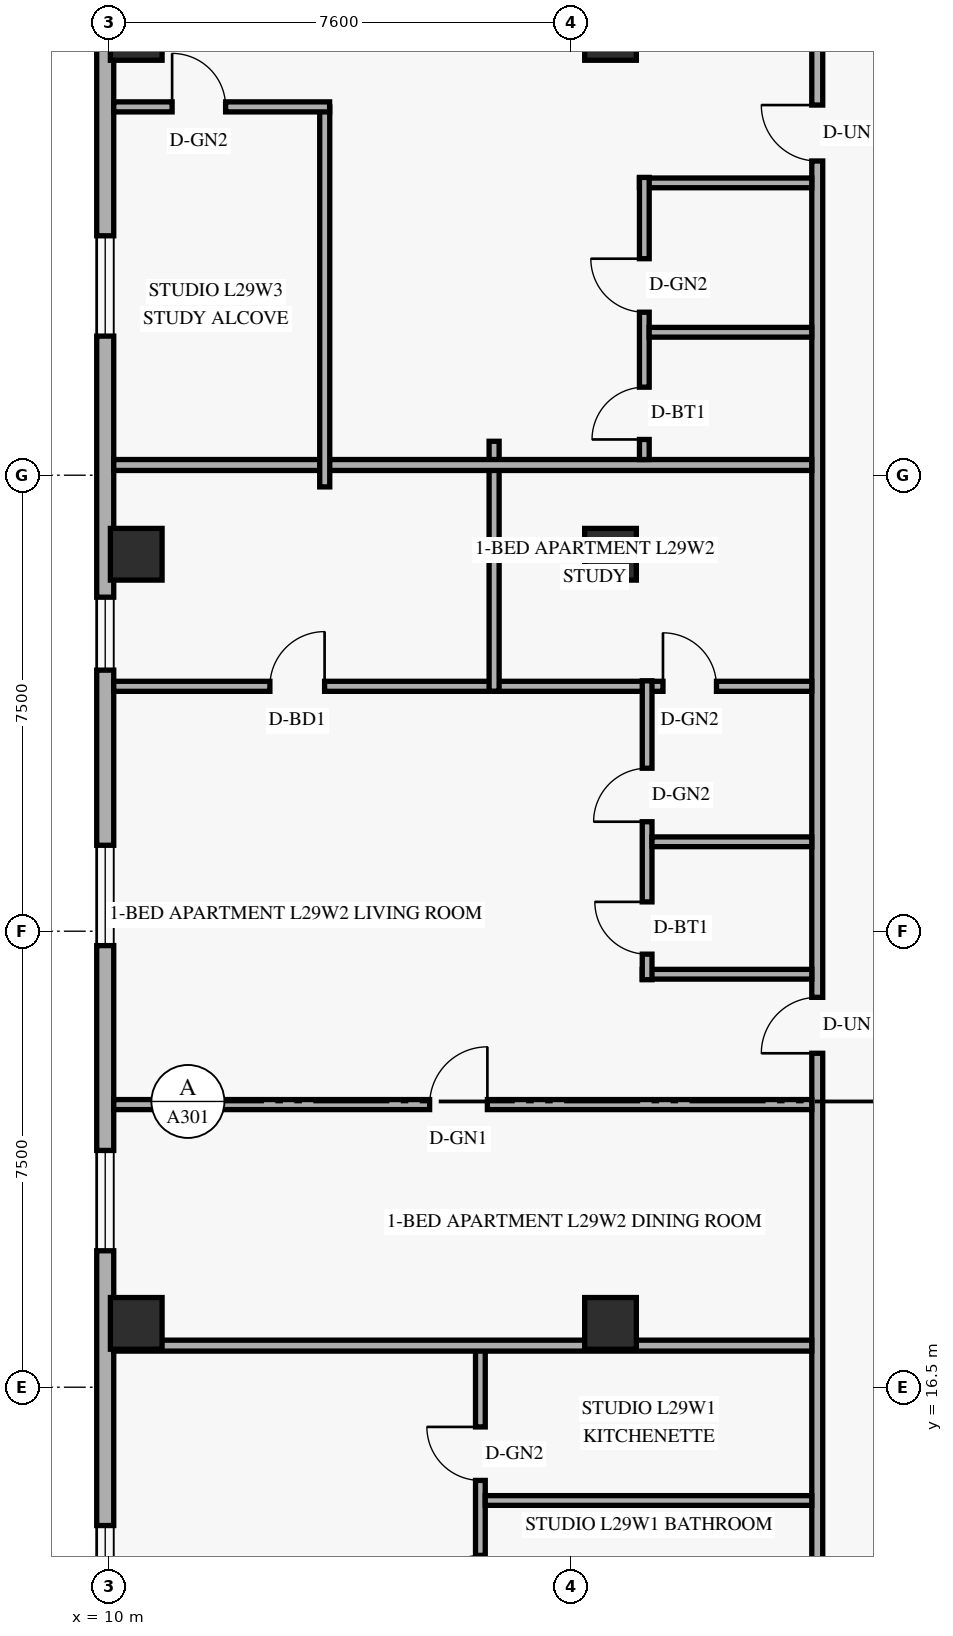
"""IFC4 building model, lengths in metres.
Left out: names, types, materials, properties, quantities, classifications, styles, units other than length and angle.
Written with IfcOpenShell. Run it as: python <this file> out.ifc"""

import sys

from ifc_helpers import new_model, si_unit, direction, frame, frame_2d, origin, origin_2d, place, context, subcontext, project, spatial, rectangle, extrude, element, fill, save


model = new_model("IFC4")
c1 = context("Model", 3, precision=1e-05, world=origin(), true_north=direction((0.0, 1.0)))
c2 = subcontext(c1, "Body", "Model", "MODEL_VIEW")
j1 = project(units=[si_unit("LENGTHUNIT", "METRE"), si_unit("PLANEANGLEUNIT", "RADIAN")], contexts=[c1])
p1 = place(None, origin())
s1 = spatial("IfcSite", under=j1, at=p1, CompositionType="ELEMENT")
p2 = place(p1, origin())
s2 = spatial("IfcBuilding", under=s1, at=p2, CompositionType="ELEMENT")
p3 = place(p2, frame((0.0, 0.0, 113.4)))
s3 = spatial("IfcBuildingStorey", under=s2, at=p3, CompositionType="ELEMENT", Elevation=113.4)
for number, where, z_axis, x_axis in (
    (1, (10.45, 17.55, 0.0), (0.0, 0.0, 1.0), (1.0, 0.0, 0.0)),
    (2, (10.45, 30.2, 0.0), (0.0, 0.0, 1.0), (1.0, 0.0, 0.0)),
    (3, (10.45, 38.75, 0.0), (0.0, 0.0, 1.0), (1.0, 0.0, 0.0)),
    (4, (18.25, 17.55, 0.0), (0.0, 0.0, 1.0), (1.0, 0.0, 0.0)),
    (5, (18.25, 30.2, 0.0), (0.0, 0.0, 1.0), (1.0, 0.0, 0.0)),
    (6, (18.25, 38.75, 0.0), (0.0, 0.0, 1.0), (1.0, 0.0, 0.0)),
):
    element("IfcColumn", number, at=place(p3, frame(where, z_axis=z_axis, x_axis=x_axis)), inside=s3, PredefinedType="COLUMN", context=c2, shape_type="SweptSolid", body=[
        extrude(rectangle(XDim=0.85, YDim=0.85, at=origin_2d()), origin(), (0.0, 0.0, 1.0), 3.6),
    ])
p4 = place(p3, frame((9.94, 41.68, 0.0), z_axis=(0.0, 0.0, 1.0), x_axis=(0.0, -1.0, 0.0)))
e7 = element("IfcWall", 7, at=p4, inside=s3, PredefinedType="SOLIDWALL", context=c2, shape_type="SweptSolid", body=[
    extrude(rectangle(XDim=35.36, YDim=0.28, at=frame_2d((17.68, 0.0))), origin(), (0.0, 0.0, 1.0), 3.35),
])
p5 = place(p4, frame((27.455, 0.0, 0.85)))
e8 = element("IfcOpeningElement", 8, at=p5, cuts=e7, PredefinedType="OPENING", context=c2, shape_type="SweptSolid", body=[
    extrude(rectangle(XDim=1.65, YDim=1.6, at=frame_2d((0.825, 0.8))), frame((0.0, 0.15, 0.0), z_axis=(0.0, -1.0, 0.0), x_axis=(1.0, 0.0, 0.0)), (0.0, 0.0, 1.0), 0.3),
])
p6 = place(p4, frame((21.286, 0.0, 0.85)))
e9 = element("IfcOpeningElement", 9, at=p6, cuts=e7, PredefinedType="OPENING", context=c2, shape_type="SweptSolid", body=[
    extrude(rectangle(XDim=1.65, YDim=1.6, at=frame_2d((0.825, 0.8))), frame((0.0, 0.15, 0.0), z_axis=(0.0, -1.0, 0.0), x_axis=(1.0, 0.0, 0.0)), (0.0, 0.0, 1.0), 0.3),
])
p7 = place(p4, frame((16.267, 0.0, 0.85)))
e10 = element("IfcOpeningElement", 10, at=p7, cuts=e7, PredefinedType="OPENING", context=c2, shape_type="SweptSolid", body=[
    extrude(rectangle(XDim=1.65, YDim=1.6, at=frame_2d((0.825, 0.8))), frame((0.0, 0.15, 0.0), z_axis=(0.0, -1.0, 0.0), x_axis=(1.0, 0.0, 0.0)), (0.0, 0.0, 1.0), 0.3),
])
p8 = place(p4, frame((12.186, 0.0, 0.85)))
e11 = element("IfcOpeningElement", 11, at=p8, cuts=e7, PredefinedType="OPENING", context=c2, shape_type="SweptSolid", body=[
    extrude(rectangle(XDim=1.2, YDim=1.5, at=frame_2d((0.6, 0.75))), frame((0.0, 0.15, 0.0), z_axis=(0.0, -1.0, 0.0), x_axis=(1.0, 0.0, 0.0)), (0.0, 0.0, 1.0), 0.3),
])
p9 = place(p4, frame((6.242, 0.0, 0.85)))
e12 = element("IfcOpeningElement", 12, at=p9, cuts=e7, PredefinedType="OPENING", context=c2, shape_type="SweptSolid", body=[
    extrude(rectangle(XDim=1.65, YDim=1.6, at=frame_2d((0.825, 0.8))), frame((0.0, 0.15, 0.0), z_axis=(0.0, -1.0, 0.0), x_axis=(1.0, 0.0, 0.0)), (0.0, 0.0, 1.0), 0.3),
])
p10 = place(p4, frame((0.58, 0.0, 0.85)))
e13 = element("IfcOpeningElement", 13, at=p10, cuts=e7, PredefinedType="OPENING", context=c2, shape_type="SweptSolid", body=[
    extrude(rectangle(XDim=1.65, YDim=1.6, at=frame_2d((0.825, 0.8))), frame((0.0, 0.15, 0.0), z_axis=(0.0, -1.0, 0.0), x_axis=(1.0, 0.0, 0.0)), (0.0, 0.0, 1.0), 0.3),
])
p11 = place(p3, frame((21.65, 6.8, 0.0), z_axis=(0.0, 0.0, 1.0), x_axis=(0.0, 1.0, 0.0)))
e14 = element("IfcWall", 14, at=p11, inside=s3, PredefinedType="STANDARD", context=c2, shape_type="SweptSolid", body=[
    extrude(rectangle(XDim=34.4, YDim=0.18, at=frame_2d((17.2, 0.0))), origin(), (0.0, 0.0, 1.0), 2.721),
])
p12 = place(p11, frame((4.444, 0.0, 0.0)))
e15 = element("IfcOpeningElement", 15, at=p12, cuts=e14, PredefinedType="OPENING", context=c2, shape_type="SweptSolid", body=[
    extrude(rectangle(XDim=0.92, YDim=2.15, at=frame_2d((0.46, 1.075))), frame((0.0, 0.1, 0.0), z_axis=(0.0, -1.0, 0.0), x_axis=(1.0, 0.0, 0.0)), (0.0, 0.0, 1.0), 0.2),
])
p13 = place(p11, frame((15.192, 0.0, 0.0)))
e16 = element("IfcOpeningElement", 16, at=p13, cuts=e14, PredefinedType="OPENING", context=c2, shape_type="SweptSolid", body=[
    extrude(rectangle(XDim=0.92, YDim=2.15, at=frame_2d((0.46, 1.075))), frame((0.0, 0.1, 0.0), z_axis=(0.0, -1.0, 0.0), x_axis=(1.0, 0.0, 0.0)), (0.0, 0.0, 1.0), 0.2),
])
p14 = place(p11, frame((29.868, 0.0, 0.0)))
e17 = element("IfcOpeningElement", 17, at=p14, cuts=e14, PredefinedType="OPENING", context=c2, shape_type="SweptSolid", body=[
    extrude(rectangle(XDim=0.92, YDim=2.15, at=frame_2d((0.46, 1.075))), frame((0.0, 0.1, 0.0), z_axis=(0.0, -1.0, 0.0), x_axis=(1.0, 0.0, 0.0)), (0.0, 0.0, 1.0), 0.2),
])
p15 = place(p3, frame((16.11, 12.454, 0.0), z_axis=(0.0, 0.0, 1.0), x_axis=(0.0, 1.0, 0.0)))
e18 = element("IfcWall", 18, at=p15, inside=s3, PredefinedType="PLUMBINGWALL", context=c2, shape_type="SweptSolid", body=[
    extrude(rectangle(XDim=4.73, YDim=0.16, at=frame_2d((2.365, 0.0))), origin(), (0.0, 0.0, 1.0), 2.978),
])
p16 = place(p15, frame((0.42, 0.0, 0.0)))
e19 = element("IfcOpeningElement", 19, at=p16, cuts=e18, PredefinedType="OPENING", context=c2, shape_type="SweptSolid", body=[
    extrude(rectangle(XDim=0.86, YDim=2.12, at=frame_2d((0.43, 1.06))), frame((0.0, 0.09, 0.0), z_axis=(0.0, -1.0, 0.0), x_axis=(1.0, 0.0, 0.0)), (0.0, 0.0, 1.0), 0.18),
])
p17 = place(p15, frame((2.513, 0.0, 0.0)))
e20 = element("IfcOpeningElement", 20, at=p17, cuts=e18, PredefinedType="OPENING", context=c2, shape_type="SweptSolid", body=[
    extrude(rectangle(XDim=0.88, YDim=2.12, at=frame_2d((0.44, 1.06))), frame((0.0, 0.09, 0.0), z_axis=(0.0, -1.0, 0.0), x_axis=(1.0, 0.0, 0.0)), (0.0, 0.0, 1.0), 0.18),
])
p18 = place(p3, frame((16.19, 14.637, 0.0), z_axis=(0.0, 0.0, 1.0), x_axis=(1.0, 0.0, 0.0)))
e21 = element("IfcWall", 21, at=p18, inside=s3, PredefinedType="PLUMBINGWALL", context=c2, shape_type="SweptSolid", body=[
    extrude(rectangle(XDim=5.37, YDim=0.16, at=frame_2d((2.685, 0.0))), origin(), (0.0, 0.0, 1.0), 2.721),
])
p19 = place(p3, frame((10.08, 17.184, 0.0), z_axis=(0.0, 0.0, 1.0), x_axis=(1.0, 0.0, 0.0)))
e22 = element("IfcWall", 22, at=p19, inside=s3, PredefinedType="PARTITIONING", context=c2, shape_type="SweptSolid", body=[
    extrude(rectangle(XDim=11.48, YDim=0.18, at=frame_2d((5.74, 0.0))), origin(), (0.0, 0.0, 1.0), 2.721),
])
p20 = place(p3, frame((10.08, 28.028, 0.0), z_axis=(0.0, 0.0, 1.0), x_axis=(1.0, 0.0, 0.0)))
e23 = element("IfcWall", 23, at=p20, inside=s3, PredefinedType="PARTITIONING", context=c2, shape_type="SweptSolid", body=[
    extrude(rectangle(XDim=11.48, YDim=0.165, at=frame_2d((5.74, 0.0))), origin(), (0.0, 0.0, 1.0), 2.721),
])
p21 = place(p20, frame((9.033, 0.0, 0.0)))
e24 = element("IfcOpeningElement", 24, at=p21, cuts=e23, PredefinedType="OPENING", context=c2, shape_type="SweptSolid", body=[
    extrude(rectangle(XDim=0.88, YDim=2.12, at=frame_2d((0.44, 1.06))), frame((0.0, 0.093, 0.0), z_axis=(0.0, -1.0, 0.0), x_axis=(1.0, 0.0, 0.0)), (0.0, 0.0, 1.0), 0.185),
])
p22 = place(p20, frame((2.568, 0.0, 0.0)))
e25 = element("IfcOpeningElement", 25, at=p22, cuts=e23, PredefinedType="OPENING", context=c2, shape_type="SweptSolid", body=[
    extrude(rectangle(XDim=0.9, YDim=2.14, at=frame_2d((0.45, 1.07))), frame((0.0, 0.093, 0.0), z_axis=(0.0, -1.0, 0.0), x_axis=(1.0, 0.0, 0.0)), (0.0, 0.0, 1.0), 0.185),
])
p23 = place(p3, frame((18.772, 23.292, 0.0), z_axis=(0.0, 0.0, 1.0), x_axis=(1.0, 0.0, 0.0)))
e26 = element("IfcWall", 26, at=p23, inside=s3, PredefinedType="PLUMBINGWALL", context=c2, shape_type="SweptSolid", body=[
    extrude(rectangle(XDim=2.788, YDim=0.16, at=frame_2d((1.394, 0.0))), origin(), (0.0, 0.0, 1.0), 3.35),
])
p24 = place(p3, frame((18.852, 23.202, 0.0), z_axis=(0.0, 0.0, 1.0), x_axis=(0.0, 1.0, 0.0)))
e27 = element("IfcWall", 27, at=p24, inside=s3, PredefinedType="PLUMBINGWALL", context=c2, shape_type="SweptSolid", body=[
    extrude(rectangle(XDim=4.916, YDim=0.16, at=frame_2d((2.458, 0.0))), origin(), (0.0, 0.0, 1.0), 3.35),
])
p25 = place(p24, frame((0.42, 0.0, 0.0)))
e28 = element("IfcOpeningElement", 28, at=p25, cuts=e27, PredefinedType="OPENING", context=c2, shape_type="SweptSolid", body=[
    extrude(rectangle(XDim=0.86, YDim=2.12, at=frame_2d((0.43, 1.06))), frame((0.0, 0.09, 0.0), z_axis=(0.0, -1.0, 0.0), x_axis=(1.0, 0.0, 0.0)), (0.0, 0.0, 1.0), 0.18),
])
p26 = place(p24, frame((2.598, 0.0, 0.0)))
e29 = element("IfcOpeningElement", 29, at=p26, cuts=e27, PredefinedType="OPENING", context=c2, shape_type="SweptSolid", body=[
    extrude(rectangle(XDim=0.88, YDim=2.12, at=frame_2d((0.44, 1.06))), frame((0.0, 0.09, 0.0), z_axis=(0.0, -1.0, 0.0), x_axis=(1.0, 0.0, 0.0)), (0.0, 0.0, 1.0), 0.18),
])
p27 = place(p3, frame((18.932, 25.471, 0.0), z_axis=(0.0, 0.0, 1.0), x_axis=(1.0, 0.0, 0.0)))
e30 = element("IfcWall", 30, at=p27, inside=s3, PredefinedType="PLUMBINGWALL", context=c2, shape_type="SweptSolid", body=[
    extrude(rectangle(XDim=2.628, YDim=0.16, at=frame_2d((1.314, 0.0))), origin(), (0.0, 0.0, 1.0), 3.35),
])
p28 = place(p3, frame((10.08, 21.149, 0.0), z_axis=(0.0, 0.0, 1.0), x_axis=(1.0, 0.0, 0.0)))
e31 = element("IfcWall", 31, at=p28, inside=s3, PredefinedType="PARTITIONING", context=c2, shape_type="SweptSolid", body=[
    extrude(rectangle(XDim=11.48, YDim=0.165, at=frame_2d((5.74, 0.0))), origin(), (0.0, 0.0, 1.0), 2.721),
])
p29 = place(p28, frame((5.195, 0.0, 0.0)))
e32 = element("IfcOpeningElement", 32, at=p29, cuts=e31, PredefinedType="OPENING", context=c2, shape_type="SweptSolid", body=[
    extrude(rectangle(XDim=0.95, YDim=2.15, at=frame_2d((0.475, 1.075))), frame((0.0, 0.093, 0.0), z_axis=(0.0, -1.0, 0.0), x_axis=(1.0, 0.0, 0.0)), (0.0, 0.0, 1.0), 0.185),
])
p30 = place(p3, frame((16.335, 27.948, 0.0), z_axis=(0.0, 0.0, 1.0), x_axis=(0.0, 1.0, 0.0)))
e33 = element("IfcWall", 33, at=p30, inside=s3, PredefinedType="PARTITIONING", context=c2, shape_type="SweptSolid", body=[
    extrude(rectangle(XDim=4.11, YDim=0.165, at=frame_2d((2.055, 0.0))), origin(), (0.0, 0.0, 1.0), 2.721),
])
p31 = place(p3, frame((10.08, 31.668, 0.0), z_axis=(0.0, 0.0, 1.0), x_axis=(1.0, 0.0, 0.0)))
e34 = element("IfcWall", 34, at=p31, inside=s3, PredefinedType="PARTITIONING", context=c2, shape_type="SweptSolid", body=[
    extrude(rectangle(XDim=11.48, YDim=0.18, at=frame_2d((5.74, 0.0))), origin(), (0.0, 0.0, 1.0), 2.721),
])
p32 = place(p3, frame((18.726, 36.308, 0.0), z_axis=(0.0, 0.0, 1.0), x_axis=(1.0, 0.0, 0.0)))
e35 = element("IfcWall", 35, at=p32, inside=s3, PredefinedType="PLUMBINGWALL", context=c2, shape_type="SweptSolid", body=[
    extrude(rectangle(XDim=2.834, YDim=0.16, at=frame_2d((1.417, 0.0))), origin(), (0.0, 0.0, 1.0), 3.35),
])
p33 = place(p3, frame((18.806, 31.758, 0.0), z_axis=(0.0, 0.0, 1.0), x_axis=(0.0, 1.0, 0.0)))
e36 = element("IfcWall", 36, at=p33, inside=s3, PredefinedType="PLUMBINGWALL", context=c2, shape_type="SweptSolid", body=[
    extrude(rectangle(XDim=4.64, YDim=0.16, at=frame_2d((2.32, 0.0))), origin(), (0.0, 0.0, 1.0), 2.978),
])
p34 = place(p33, frame((0.33, 0.0, 0.0)))
e37 = element("IfcOpeningElement", 37, at=p34, cuts=e36, PredefinedType="OPENING", context=c2, shape_type="SweptSolid", body=[
    extrude(rectangle(XDim=0.86, YDim=2.12, at=frame_2d((0.43, 1.06))), frame((0.0, 0.09, 0.0), z_axis=(0.0, -1.0, 0.0), x_axis=(1.0, 0.0, 0.0)), (0.0, 0.0, 1.0), 0.18),
])
p35 = place(p33, frame((2.423, 0.0, 0.0)))
e38 = element("IfcOpeningElement", 38, at=p35, cuts=e36, PredefinedType="OPENING", context=c2, shape_type="SweptSolid", body=[
    extrude(rectangle(XDim=0.88, YDim=2.12, at=frame_2d((0.44, 1.06))), frame((0.0, 0.09, 0.0), z_axis=(0.0, -1.0, 0.0), x_axis=(1.0, 0.0, 0.0)), (0.0, 0.0, 1.0), 0.18),
])
p36 = place(p3, frame((18.886, 33.851, 0.0), z_axis=(0.0, 0.0, 1.0), x_axis=(1.0, 0.0, 0.0)))
e39 = element("IfcWall", 39, at=p36, inside=s3, PredefinedType="PLUMBINGWALL", context=c2, shape_type="SweptSolid", body=[
    extrude(rectangle(XDim=2.674, YDim=0.16, at=frame_2d((1.337, 0.0))), origin(), (0.0, 0.0, 1.0), 3.35),
])
p37 = place(p3, frame((13.55, 31.308, 0.0), z_axis=(0.0, 0.0, 1.0), x_axis=(0.0, 1.0, 0.0)))
e40 = element("IfcWall", 40, at=p37, inside=s3, PredefinedType="PARTITIONING", context=c2, shape_type="SweptSolid", body=[
    extrude(rectangle(XDim=6.25, YDim=0.165, at=frame_2d((3.125, 0.0))), origin(), (0.0, 0.0, 1.0), 2.978),
])
p38 = place(p3, frame((10.08, 37.558, 0.0), z_axis=(0.0, 0.0, 1.0), x_axis=(1.0, 0.0, 0.0)))
e41 = element("IfcWall", 41, at=p38, inside=s3, PredefinedType="PARTITIONING", context=c2, shape_type="SweptSolid", body=[
    extrude(rectangle(XDim=3.55, YDim=0.165, at=frame_2d((1.775, 0.0))), origin(), (0.0, 0.0, 1.0), 2.799),
])
p39 = place(p38, frame((0.96, 0.0, 0.0)))
e42 = element("IfcOpeningElement", 42, at=p39, cuts=e41, PredefinedType="OPENING", context=c2, shape_type="SweptSolid", body=[
    extrude(rectangle(XDim=0.88, YDim=2.12, at=frame_2d((0.44, 1.06))), frame((0.0, 0.093, 0.0), z_axis=(0.0, -1.0, 0.0), x_axis=(1.0, 0.0, 0.0)), (0.0, 0.0, 1.0), 0.185),
])
p40 = place(p5, origin())
e43 = element("IfcWindow", 43, at=p40, inside=s3, PartitioningType="SINGLE_PANEL", PredefinedType="WINDOW", context=c2, shape_type="SweptSolid", body=[
    extrude(rectangle(XDim=1.65, YDim=1.6, at=frame_2d((0.825, 0.8))), frame((0.0, 0.03, 0.0), z_axis=(0.0, -1.0, 0.0), x_axis=(1.0, 0.0, 0.0)), (0.0, 0.0, 1.0), 0.06),
])
fill(e8, e43)
p41 = place(p6, origin())
e44 = element("IfcWindow", 44, at=p41, inside=s3, PartitioningType="SINGLE_PANEL", PredefinedType="WINDOW", context=c2, shape_type="SweptSolid", body=[
    extrude(rectangle(XDim=1.65, YDim=1.6, at=frame_2d((0.825, 0.8))), frame((0.0, 0.03, 0.0), z_axis=(0.0, -1.0, 0.0), x_axis=(1.0, 0.0, 0.0)), (0.0, 0.0, 1.0), 0.06),
])
fill(e9, e44)
p42 = place(p7, origin())
e45 = element("IfcWindow", 45, at=p42, inside=s3, PartitioningType="SINGLE_PANEL", PredefinedType="WINDOW", context=c2, shape_type="SweptSolid", body=[
    extrude(rectangle(XDim=1.65, YDim=1.6, at=frame_2d((0.825, 0.8))), frame((0.0, 0.03, 0.0), z_axis=(0.0, -1.0, 0.0), x_axis=(1.0, 0.0, 0.0)), (0.0, 0.0, 1.0), 0.06),
])
fill(e10, e45)
p43 = place(p8, origin())
e46 = element("IfcWindow", 46, at=p43, inside=s3, PartitioningType="SINGLE_PANEL", PredefinedType="WINDOW", context=c2, shape_type="SweptSolid", body=[
    extrude(rectangle(XDim=1.2, YDim=1.5, at=frame_2d((0.6, 0.75))), frame((0.0, 0.03, 0.0), z_axis=(0.0, -1.0, 0.0), x_axis=(1.0, 0.0, 0.0)), (0.0, 0.0, 1.0), 0.06),
])
fill(e11, e46)
p44 = place(p9, origin())
e47 = element("IfcWindow", 47, at=p44, inside=s3, PartitioningType="SINGLE_PANEL", PredefinedType="WINDOW", context=c2, shape_type="SweptSolid", body=[
    extrude(rectangle(XDim=1.65, YDim=1.6, at=frame_2d((0.825, 0.8))), frame((0.0, 0.03, 0.0), z_axis=(0.0, -1.0, 0.0), x_axis=(1.0, 0.0, 0.0)), (0.0, 0.0, 1.0), 0.06),
])
fill(e12, e47)
p45 = place(p16, origin())
e48 = element("IfcDoor", 48, at=p45, inside=s3, OperationType="SINGLE_SWING_LEFT", PredefinedType="DOOR", context=c2, shape_type="SweptSolid", body=[
    extrude(rectangle(XDim=0.86, YDim=2.12, at=frame_2d((0.43, 1.06))), frame((0.0, 0.025, 0.0), z_axis=(0.0, -1.0, 0.0), x_axis=(1.0, 0.0, 0.0)), (0.0, 0.0, 1.0), 0.05),
])
fill(e19, e48)
p46 = place(p17, origin())
e49 = element("IfcDoor", 49, at=p46, inside=s3, OperationType="SINGLE_SWING_RIGHT", PredefinedType="DOOR", context=c2, shape_type="SweptSolid", body=[
    extrude(rectangle(XDim=0.88, YDim=2.12, at=frame_2d((0.44, 1.06))), frame((0.0, 0.025, 0.0), z_axis=(0.0, -1.0, 0.0), x_axis=(1.0, 0.0, 0.0)), (0.0, 0.0, 1.0), 0.05),
])
fill(e20, e49)
p47 = place(p29, origin())
e50 = element("IfcDoor", 50, at=p47, inside=s3, OperationType="SINGLE_SWING_RIGHT", PredefinedType="DOOR", context=c2, shape_type="SweptSolid", body=[
    extrude(rectangle(XDim=0.95, YDim=2.15, at=frame_2d((0.475, 1.075))), frame((0.0, 0.025, 0.0), z_axis=(0.0, -1.0, 0.0), x_axis=(1.0, 0.0, 0.0)), (0.0, 0.0, 1.0), 0.05),
])
fill(e32, e50)
p48 = place(p13, origin())
e51 = element("IfcDoor", 51, at=p48, inside=s3, OperationType="SINGLE_SWING_LEFT", PredefinedType="DOOR", context=c2, shape_type="SweptSolid", body=[
    extrude(rectangle(XDim=0.92, YDim=2.15, at=frame_2d((0.46, 1.075))), frame((0.0, 0.025, 0.0), z_axis=(0.0, -1.0, 0.0), x_axis=(1.0, 0.0, 0.0)), (0.0, 0.0, 1.0), 0.05),
])
fill(e16, e51)
p49 = place(p25, origin())
e52 = element("IfcDoor", 52, at=p49, inside=s3, OperationType="SINGLE_SWING_RIGHT", PredefinedType="DOOR", context=c2, shape_type="SweptSolid", body=[
    extrude(rectangle(XDim=0.86, YDim=2.12, at=frame_2d((0.43, 1.06))), frame((0.0, 0.025, 0.0), z_axis=(0.0, -1.0, 0.0), x_axis=(1.0, 0.0, 0.0)), (0.0, 0.0, 1.0), 0.05),
])
fill(e28, e52)
p50 = place(p26, origin())
e53 = element("IfcDoor", 53, at=p50, inside=s3, OperationType="SINGLE_SWING_LEFT", PredefinedType="DOOR", context=c2, shape_type="SweptSolid", body=[
    extrude(rectangle(XDim=0.88, YDim=2.12, at=frame_2d((0.44, 1.06))), frame((0.0, 0.025, 0.0), z_axis=(0.0, -1.0, 0.0), x_axis=(1.0, 0.0, 0.0)), (0.0, 0.0, 1.0), 0.05),
])
fill(e29, e53)
p51 = place(p21, origin())
e54 = element("IfcDoor", 54, at=p51, inside=s3, OperationType="SINGLE_SWING_LEFT", PredefinedType="DOOR", context=c2, shape_type="SweptSolid", body=[
    extrude(rectangle(XDim=0.88, YDim=2.12, at=frame_2d((0.44, 1.06))), frame((0.0, 0.025, 0.0), z_axis=(0.0, -1.0, 0.0), x_axis=(1.0, 0.0, 0.0)), (0.0, 0.0, 1.0), 0.05),
])
fill(e24, e54)
p52 = place(p22, origin())
e55 = element("IfcDoor", 55, at=p52, inside=s3, OperationType="SINGLE_SWING_RIGHT", PredefinedType="DOOR", context=c2, shape_type="SweptSolid", body=[
    extrude(rectangle(XDim=0.9, YDim=2.14, at=frame_2d((0.45, 1.07))), frame((0.0, 0.025, 0.0), z_axis=(0.0, -1.0, 0.0), x_axis=(1.0, 0.0, 0.0)), (0.0, 0.0, 1.0), 0.05),
])
fill(e25, e55)
p53 = place(p39, origin())
e56 = element("IfcDoor", 56, at=p53, inside=s3, OperationType="SINGLE_SWING_LEFT", PredefinedType="DOOR", context=c2, shape_type="SweptSolid", body=[
    extrude(rectangle(XDim=0.88, YDim=2.12, at=frame_2d((0.44, 1.06))), frame((0.0, 0.025, 0.0), z_axis=(0.0, -1.0, 0.0), x_axis=(1.0, 0.0, 0.0)), (0.0, 0.0, 1.0), 0.05),
])
fill(e42, e56)
p54 = place(p14, origin())
e57 = element("IfcDoor", 57, at=p54, inside=s3, OperationType="SINGLE_SWING_RIGHT", PredefinedType="DOOR", context=c2, shape_type="SweptSolid", body=[
    extrude(rectangle(XDim=0.92, YDim=2.15, at=frame_2d((0.46, 1.075))), frame((0.0, 0.025, 0.0), z_axis=(0.0, -1.0, 0.0), x_axis=(1.0, 0.0, 0.0)), (0.0, 0.0, 1.0), 0.05),
])
fill(e17, e57)
p55 = place(p34, origin())
e58 = element("IfcDoor", 58, at=p55, inside=s3, OperationType="SINGLE_SWING_LEFT", PredefinedType="DOOR", context=c2, shape_type="SweptSolid", body=[
    extrude(rectangle(XDim=0.86, YDim=2.12, at=frame_2d((0.43, 1.06))), frame((0.0, 0.025, 0.0), z_axis=(0.0, -1.0, 0.0), x_axis=(1.0, 0.0, 0.0)), (0.0, 0.0, 1.0), 0.05),
])
fill(e37, e58)
p56 = place(p35, origin())
e59 = element("IfcDoor", 59, at=p56, inside=s3, OperationType="SINGLE_SWING_RIGHT", PredefinedType="DOOR", context=c2, shape_type="SweptSolid", body=[
    extrude(rectangle(XDim=0.88, YDim=2.12, at=frame_2d((0.44, 1.06))), frame((0.0, 0.025, 0.0), z_axis=(0.0, -1.0, 0.0), x_axis=(1.0, 0.0, 0.0)), (0.0, 0.0, 1.0), 0.05),
])
fill(e38, e59)
save(model, sys.argv[1])
